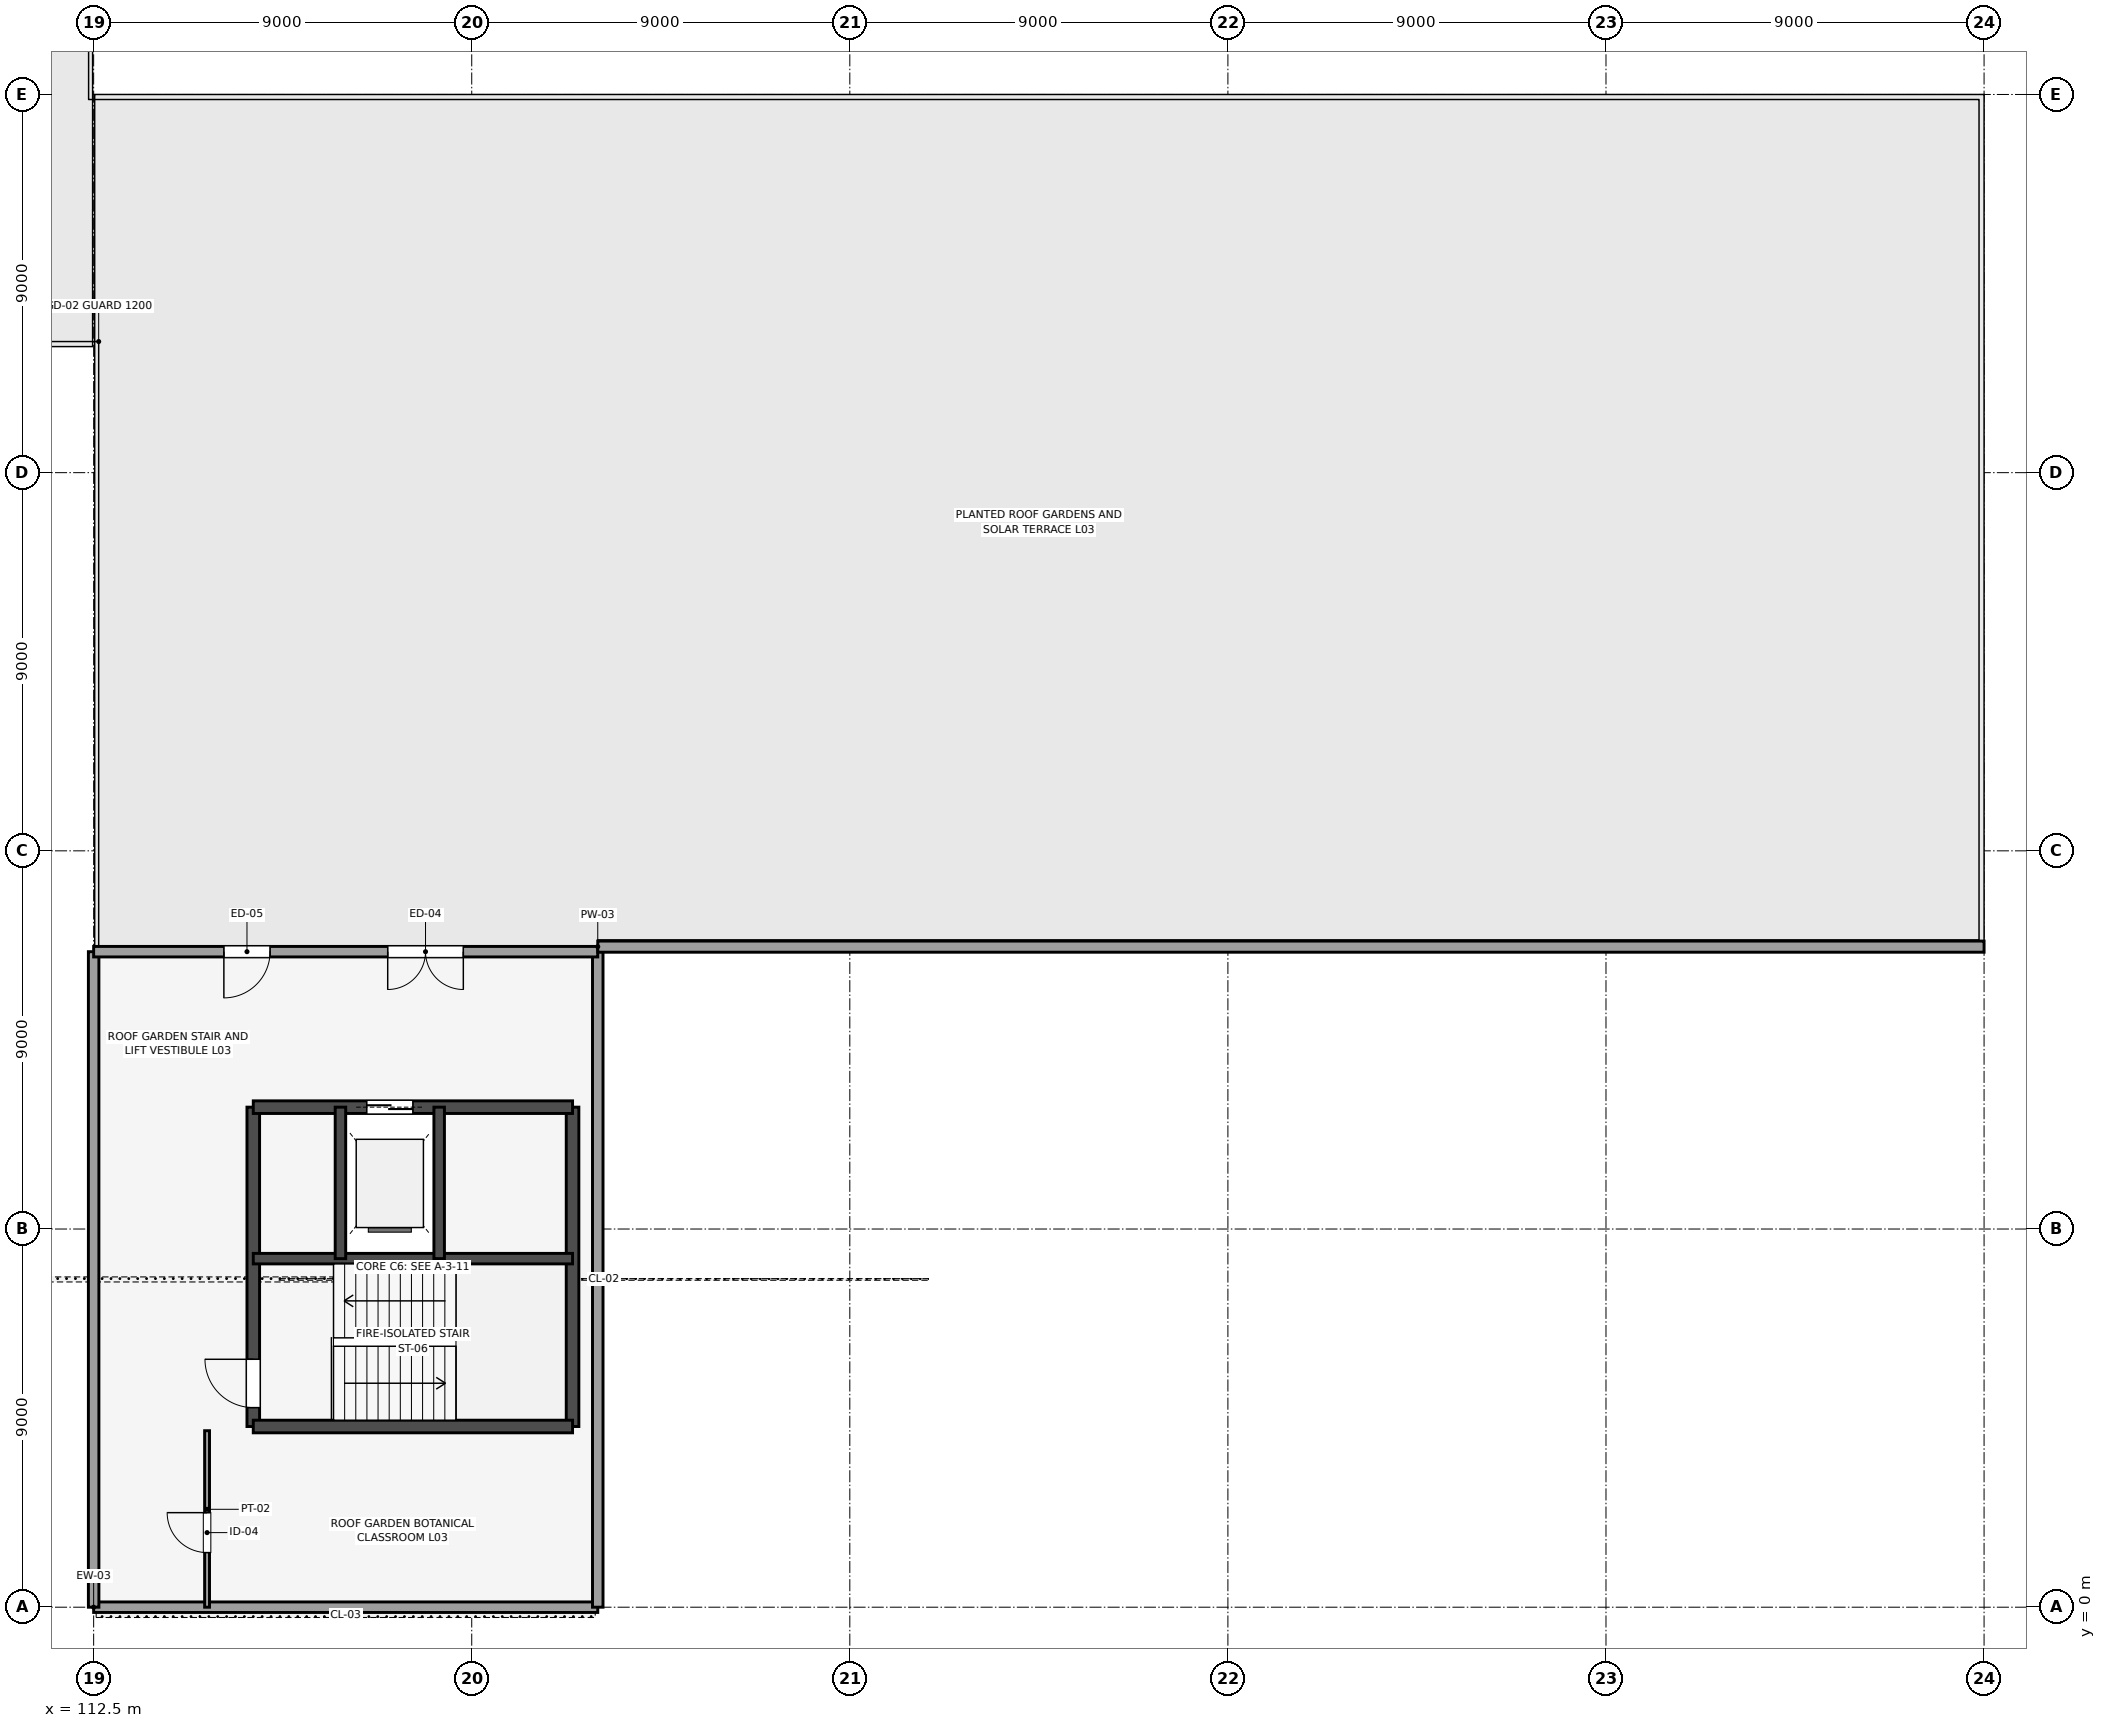
"""IFC4 building model, lengths in metres.
Left out: names, types, materials, properties, quantities, classifications, styles, units other than length and angle.
Written with IfcOpenShell. Run it as: python <this file> out.ifc"""

import sys

from ifc_helpers import new_model, si_unit, direction, frame, frame_2d, origin, place, context, subcontext, project, spatial, rectangle, extrude, element, fill, save


model = new_model("IFC4")
c1 = context("Model", 3, precision=1e-05, world=origin(), true_north=direction((0.0, 1.0)))
c2 = subcontext(c1, "Body", "Model", "MODEL_VIEW")
j1 = project(units=[si_unit("LENGTHUNIT", "METRE"), si_unit("PLANEANGLEUNIT", "RADIAN")], contexts=[c1])
p1 = place(None, origin())
s1 = spatial("IfcSite", under=j1, at=p1, CompositionType="ELEMENT")
p2 = place(p1, origin())
s2 = spatial("IfcBuilding", under=s1, at=p2, CompositionType="ELEMENT")
p3 = place(p2, frame((0.0, 0.0, 14.4)))
s3 = spatial("IfcBuildingStorey", under=s2, at=p3, CompositionType="ELEMENT", Elevation=14.4)
p4 = place(p3, frame((116.3, 4.3, 0.0), z_axis=(0.0, 0.0, 1.0), x_axis=(0.0, 1.0, 0.0)))
e1 = element("IfcWall", 1, at=p4, inside=s3, PredefinedType="SHEAR", context=c2, shape_type="SweptSolid", body=[
    extrude(rectangle(XDim=7.6, YDim=0.3, at=frame_2d((3.8, 0.0))), origin(), (0.0, 0.0, 1.0), 2.8),
])
p5 = place(p4, frame((0.45, 0.0, 0.0)))
e2 = element("IfcOpeningElement", 2, at=p5, cuts=e1, PredefinedType="OPENING", context=c2, shape_type="SweptSolid", body=[
    extrude(rectangle(XDim=1.15, YDim=2.15, at=frame_2d((0.575, 1.075))), frame((0.0, 0.16, 0.0), z_axis=(0.0, -1.0, 0.0), x_axis=(1.0, 0.0, 0.0)), (0.0, 0.0, 1.0), 0.32),
])
for number, where, z_axis, x_axis in (
    (3, (123.9, 4.3, 0.0), (0.0, 0.0, 1.0), (0.0, 1.0, 0.0)),
    (4, (116.3, 4.3, 0.0), (0.0, 0.0, 1.0), (1.0, 0.0, 0.0)),
):
    element("IfcWall", number, at=place(p3, frame(where, z_axis=z_axis, x_axis=x_axis)), inside=s3, PredefinedType="SHEAR", context=c2, shape_type="SweptSolid", body=[
        extrude(rectangle(XDim=7.6, YDim=0.3, at=frame_2d((3.8, 0.0))), origin(), (0.0, 0.0, 1.0), 2.8),
    ])
p6 = place(p3, frame((116.3, 11.9, 0.0), z_axis=(0.0, 0.0, 1.0), x_axis=(1.0, 0.0, 0.0)))
e5 = element("IfcWall", 5, at=p6, inside=s3, PredefinedType="SHEAR", context=c2, shape_type="SweptSolid", body=[
    extrude(rectangle(XDim=7.6, YDim=0.3, at=frame_2d((3.8, 0.0))), origin(), (0.0, 0.0, 1.0), 2.8),
])
p7 = place(p6, frame((2.7, 0.0, 0.0)))
e6 = element("IfcOpeningElement", 6, at=p7, cuts=e5, PredefinedType="OPENING", context=c2, shape_type="SweptSolid", body=[
    extrude(rectangle(XDim=1.1, YDim=2.2, at=frame_2d((0.55, 1.1))), frame((0.0, 0.16, 0.0), z_axis=(0.0, -1.0, 0.0), x_axis=(1.0, 0.0, 0.0)), (0.0, 0.0, 1.0), 0.32),
])
p8 = place(p3, frame((116.3, 8.295, 0.0), z_axis=(0.0, 0.0, 1.0), x_axis=(1.0, 0.0, 0.0)))
e7 = element("IfcWall", 7, at=p8, inside=s3, PredefinedType="SHEAR", context=c2, shape_type="SweptSolid", body=[
    extrude(rectangle(XDim=7.6, YDim=0.25, at=frame_2d((3.8, 0.0))), origin(), (0.0, 0.0, 1.0), 2.8),
])
for number, where, z_axis, x_axis in (
    (8, (118.375, 8.295, 0.0), (0.0, 0.0, 1.0), (0.0, 1.0, 0.0)),
    (9, (120.725, 8.295, 0.0), (0.0, 0.0, 1.0), (0.0, 1.0, 0.0)),
):
    element("IfcWall", number, at=place(p3, frame(where, z_axis=z_axis, x_axis=x_axis)), inside=s3, PredefinedType="SHEAR", context=c2, shape_type="SweptSolid", body=[
        extrude(rectangle(XDim=3.605, YDim=0.25, at=frame_2d((1.802, 0.0))), origin(), (0.0, 0.0, 1.0), 2.8),
    ])
p9 = place(p3, frame((112.5, 0.0, 0.0), z_axis=(0.0, 0.0, 1.0), x_axis=(1.0, 0.0, 0.0)))
e10 = element("IfcWall", 10, at=p9, inside=s3, PredefinedType="STANDARD", context=c2, shape_type="SweptSolid", body=[
    extrude(rectangle(XDim=12.0, YDim=0.25, at=frame_2d((6.0, 0.0))), origin(), (0.0, 0.0, 1.0), 2.8),
])
for number, where, z_axis, x_axis in (
    (11, (112.5, 15.6, 0.0), (0.0, 0.0, 1.0), (0.0, -1.0, 0.0)),
    (12, (124.5, 0.0, 0.0), (0.0, 0.0, 1.0), (0.0, 1.0, 0.0)),
):
    element("IfcWall", number, at=place(p3, frame(where, z_axis=z_axis, x_axis=x_axis)), inside=s3, PredefinedType="STANDARD", context=c2, shape_type="SweptSolid", body=[
        extrude(rectangle(XDim=15.6, YDim=0.25, at=frame_2d((7.8, 0.0))), origin(), (0.0, 0.0, 1.0), 2.8),
    ])
p10 = place(p3, frame((124.5, 15.6, 0.0), z_axis=(0.0, 0.0, 1.0), x_axis=(-1.0, 0.0, 0.0)))
e13 = element("IfcWall", 13, at=p10, inside=s3, PredefinedType="STANDARD", context=c2, shape_type="SweptSolid", body=[
    extrude(rectangle(XDim=12.0, YDim=0.25, at=frame_2d((6.0, 0.0))), origin(), (0.0, 0.0, 1.0), 2.8),
])
p11 = place(p10, frame((3.2, 0.0, 0.0)))
e14 = element("IfcOpeningElement", 14, at=p11, cuts=e13, PredefinedType="OPENING", context=c2, shape_type="SweptSolid", body=[
    extrude(rectangle(XDim=1.8, YDim=2.3, at=frame_2d((0.9, 1.15))), frame((0.0, 0.135, 0.0), z_axis=(0.0, -1.0, 0.0), x_axis=(1.0, 0.0, 0.0)), (0.0, 0.0, 1.0), 0.27),
])
p12 = place(p10, frame((7.8, 0.0, 0.0)))
e15 = element("IfcOpeningElement", 15, at=p12, cuts=e13, PredefinedType="OPENING", context=c2, shape_type="SweptSolid", body=[
    extrude(rectangle(XDim=1.1, YDim=2.2, at=frame_2d((0.55, 1.1))), frame((0.0, 0.135, 0.0), z_axis=(0.0, -1.0, 0.0), x_axis=(1.0, 0.0, 0.0)), (0.0, 0.0, 1.0), 0.27),
])
p13 = place(p3, frame((124.5, 15.72, 0.0), z_axis=(0.0, 0.0, 1.0), x_axis=(1.0, 0.0, 0.0)))
e16 = element("IfcWall", 16, at=p13, inside=s3, PredefinedType="PARAPET", context=c2, shape_type="SweptSolid", body=[
    extrude(rectangle(XDim=33.0, YDim=0.265, at=frame_2d((16.5, 0.0))), origin(), (0.0, 0.0, 1.0), 1.15),
])
p14 = place(p3, frame((115.2, 0.0, 0.0), z_axis=(0.0, 0.0, 1.0), x_axis=(0.0, 1.0, 0.0)))
e17 = element("IfcWall", 17, at=p14, inside=s3, PredefinedType="PARTITIONING", context=c2, shape_type="SweptSolid", body=[
    extrude(rectangle(XDim=4.2, YDim=0.116, at=frame_2d((2.1, 0.0))), origin(), (0.0, 0.0, 1.0), 4.32),
])
p15 = place(p14, frame((1.3, 0.0, 0.0)))
e18 = element("IfcOpeningElement", 18, at=p15, cuts=e17, PredefinedType="OPENING", context=c2, shape_type="SweptSolid", body=[
    extrude(rectangle(XDim=0.95, YDim=2.15, at=frame_2d((0.475, 1.075))), frame((0.0, 0.068, 0.0), z_axis=(0.0, -1.0, 0.0), x_axis=(1.0, 0.0, 0.0)), (0.0, 0.0, 1.0), 0.136),
])
p16 = place(p11, origin())
e19 = element("IfcDoor", 19, at=p16, inside=s3, OperationType="DOUBLE_DOOR_SINGLE_SWING", PredefinedType="DOOR", context=c2, shape_type="SweptSolid", body=[
    extrude(rectangle(XDim=1.8, YDim=2.3, at=frame_2d((0.9, 1.15))), frame((0.0, 0.025, 0.0), z_axis=(0.0, -1.0, 0.0), x_axis=(1.0, 0.0, 0.0)), (0.0, 0.0, 1.0), 0.05),
])
fill(e14, e19)
p17 = place(p12, origin())
e20 = element("IfcDoor", 20, at=p17, inside=s3, OperationType="SINGLE_SWING_RIGHT", PredefinedType="DOOR", context=c2, shape_type="SweptSolid", body=[
    extrude(rectangle(XDim=1.1, YDim=2.2, at=frame_2d((0.55, 1.1))), frame((0.0, 0.025, 0.0), z_axis=(0.0, -1.0, 0.0), x_axis=(1.0, 0.0, 0.0)), (0.0, 0.0, 1.0), 0.05),
])
fill(e15, e20)
p18 = place(p5, origin())
e21 = element("IfcDoor", 21, at=p18, inside=s3, OperationType="SINGLE_SWING_RIGHT", PredefinedType="DOOR", context=c2, shape_type="SweptSolid", body=[
    extrude(rectangle(XDim=1.15, YDim=2.15, at=frame_2d((0.575, 1.075))), frame((0.0, 0.025, 0.0), z_axis=(0.0, -1.0, 0.0), x_axis=(1.0, 0.0, 0.0)), (0.0, 0.0, 1.0), 0.05),
])
fill(e2, e21)
p19 = place(p7, origin())
e22 = element("IfcDoor", 22, at=p19, inside=s3, OperationType="DOUBLE_DOOR_SLIDING", PredefinedType="DOOR", context=c2, shape_type="SweptSolid", body=[
    extrude(rectangle(XDim=1.1, YDim=2.2, at=frame_2d((0.55, 1.1))), frame((0.0, 0.025, 0.0), z_axis=(0.0, -1.0, 0.0), x_axis=(1.0, 0.0, 0.0)), (0.0, 0.0, 1.0), 0.05),
])
fill(e6, e22)
p20 = place(p15, origin())
e23 = element("IfcDoor", 23, at=p20, inside=s3, OperationType="SINGLE_SWING_RIGHT", PredefinedType="DOOR", context=c2, shape_type="SweptSolid", body=[
    extrude(rectangle(XDim=0.95, YDim=2.15, at=frame_2d((0.475, 1.075))), frame((0.0, 0.025, 0.0), z_axis=(0.0, -1.0, 0.0), x_axis=(1.0, 0.0, 0.0)), (0.0, 0.0, 1.0), 0.05),
])
fill(e18, e23)
save(model, sys.argv[1])
